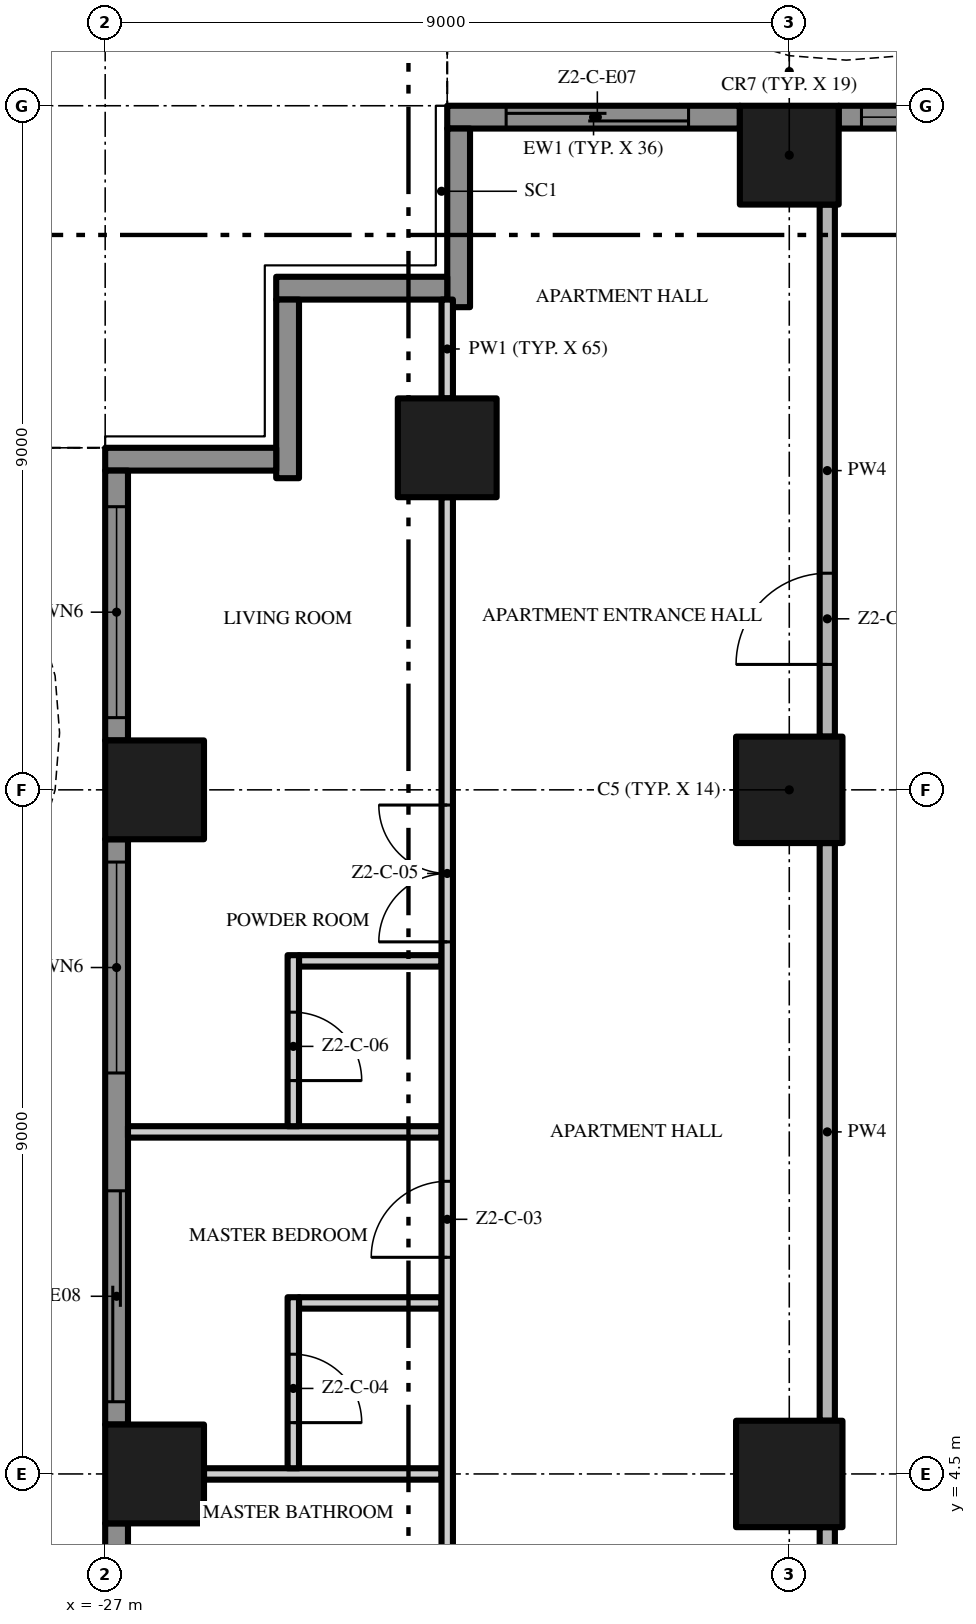
"""IFC4 building model, lengths in metres.
Left out: names, types, materials, properties, quantities, classifications, styles, units other than length and angle.
Written with IfcOpenShell. Run it as: python <this file> out.ifc"""

import sys

from ifc_helpers import new_model, si_unit, direction, frame, frame_2d, origin, origin_2d, place, context, subcontext, project, spatial, polyline, rectangle, outline, extrude, element, fill, save


model = new_model("IFC4")
c1 = context("Model", 3, precision=1e-05, world=origin(), true_north=direction((0.0, 1.0)))
c2 = subcontext(c1, "Body", "Model", "MODEL_VIEW")
j1 = project(units=[si_unit("LENGTHUNIT", "METRE"), si_unit("PLANEANGLEUNIT", "RADIAN")], contexts=[c1])
p1 = place(None, origin())
s1 = spatial("IfcSite", under=j1, at=p1, CompositionType="ELEMENT")
p2 = place(p1, origin())
s2 = spatial("IfcBuilding", under=s1, at=p2, CompositionType="ELEMENT")
p3 = place(p2, frame((0.0, 0.0, 92.2)))
s3 = spatial("IfcBuildingStorey", under=s2, at=p3, CompositionType="ELEMENT", Elevation=92.2)
p4 = place(p3, frame((-18.0, 13.5, 0.0), z_axis=(0.0, 0.0, 1.0), x_axis=(1.0, 0.0, 0.0)))
e1 = element("IfcColumn", 1, at=p4, inside=s3, PredefinedType="COLUMN", context=c2, shape_type="SweptSolid", body=[
    extrude(rectangle(XDim=1.4, YDim=1.4, at=origin_2d()), origin(), (0.0, 0.0, 1.0), 3.5),
])
p5 = place(p3, frame((-18.0, 21.85, 0.0), z_axis=(0.0, 0.0, 1.0), x_axis=(1.0, 0.0, 0.0)))
e2 = element("IfcColumn", 2, at=p5, inside=s3, PredefinedType="COLUMN", context=c2, shape_type="SweptSolid", body=[
    extrude(rectangle(XDim=1.3, YDim=1.3, at=origin_2d()), origin(), (0.0, 0.0, 1.0), 3.5),
])
p6 = place(p3, frame((-18.0, 4.5, 0.0), z_axis=(0.0, 0.0, 1.0), x_axis=(1.0, 0.0, 0.0)))
e3 = element("IfcColumn", 3, at=p6, inside=s3, PredefinedType="COLUMN", context=c2, shape_type="SweptSolid", body=[
    extrude(rectangle(XDim=1.4, YDim=1.4, at=origin_2d()), origin(), (0.0, 0.0, 1.0), 3.5),
])
for number, where, z_axis, x_axis in (
    (4, (-26.35, 13.5, 0.0), (0.0, 0.0, 1.0), (1.0, 0.0, 0.0)),
    (5, (-22.5, 18.0, 0.0), (0.0, 0.0, 1.0), (1.0, 0.0, 0.0)),
    (6, (-26.35, 4.5, 0.0), (0.0, 0.0, 1.0), (1.0, 0.0, 0.0)),
):
    element("IfcColumn", number, at=place(p3, frame(where, z_axis=z_axis, x_axis=x_axis)), inside=s3, PredefinedType="COLUMN", context=c2, shape_type="SweptSolid", body=[
        extrude(rectangle(XDim=1.3, YDim=1.3, at=origin_2d()), origin(), (0.0, 0.0, 1.0), 3.5),
    ])
p7 = place(p3, frame((-17.35, 22.35, 0.0), z_axis=(0.0, 0.0, 1.0), x_axis=(1.0, 0.0, 0.0)))
e7 = element("IfcWall", 7, at=p7, inside=s3, PredefinedType="SOLIDWALL", context=c2, shape_type="SweptSolid", body=[
    extrude(rectangle(XDim=3.85, YDim=0.3, at=frame_2d((1.925, 0.0))), origin(), (0.0, 0.0, 1.0), 3.5),
])
p8 = place(p7, frame((0.3, 0.0, 0.45)))
e8 = element("IfcOpeningElement", 8, at=p8, cuts=e7, PredefinedType="OPENING", context=c2, shape_type="SweptSolid", body=[
    extrude(rectangle(XDim=2.775, YDim=2.65, at=frame_2d((1.387, 1.325))), frame((0.0, 0.16, 0.0), z_axis=(0.0, -1.0, 0.0), x_axis=(1.0, 0.0, 0.0)), (0.0, 0.0, 1.0), 0.32),
])
p9 = place(p3, frame((-22.5, 22.35, 0.0), z_axis=(0.0, 0.0, 1.0), x_axis=(1.0, 0.0, 0.0)))
e9 = element("IfcWall", 9, at=p9, inside=s3, PredefinedType="SOLIDWALL", context=c2, shape_type="SweptSolid", body=[
    extrude(rectangle(XDim=3.85, YDim=0.3, at=frame_2d((1.925, 0.0))), origin(), (0.0, 0.0, 1.0), 3.5),
])
p10 = place(p9, frame((0.775, 0.0, 0.0)))
e10 = element("IfcOpeningElement", 10, at=p10, cuts=e9, PredefinedType="OPENING", context=c2, shape_type="SweptSolid", body=[
    extrude(rectangle(XDim=2.4, YDim=2.4, at=frame_2d((1.2, 1.2))), frame((0.0, 0.16, 0.0), z_axis=(0.0, -1.0, 0.0), x_axis=(1.0, 0.0, 0.0)), (0.0, 0.0, 1.0), 0.32),
])
p11 = place(p3, frame((-22.35, 19.85, 0.0), z_axis=(0.0, 0.0, 1.0), x_axis=(0.0, 1.0, 0.0)))
e11 = element("IfcWall", 11, at=p11, inside=s3, PredefinedType="SOLIDWALL", context=c2, shape_type="SweptSolid", body=[
    extrude(rectangle(XDim=2.35, YDim=0.3, at=frame_2d((1.175, 0.0))), origin(), (0.0, 0.0, 1.0), 3.5),
])
p12 = place(p3, frame((-24.75, 20.1, 0.0), z_axis=(0.0, 0.0, 1.0), x_axis=(1.0, 0.0, 0.0)))
e12 = element("IfcWall", 12, at=p12, inside=s3, PredefinedType="SOLIDWALL", context=c2, shape_type="SweptSolid", body=[
    extrude(rectangle(XDim=2.25, YDim=0.3, at=frame_2d((1.125, 0.0))), origin(), (0.0, 0.0, 1.0), 3.5),
])
p13 = place(p3, frame((-24.6, 17.6, 0.0), z_axis=(0.0, 0.0, 1.0), x_axis=(0.0, 1.0, 0.0)))
e13 = element("IfcWall", 13, at=p13, inside=s3, PredefinedType="SOLIDWALL", context=c2, shape_type="SweptSolid", body=[
    extrude(rectangle(XDim=2.35, YDim=0.3, at=frame_2d((1.175, 0.0))), origin(), (0.0, 0.0, 1.0), 3.5),
])
p14 = place(p3, frame((-27.0, 17.85, 0.0), z_axis=(0.0, 0.0, 1.0), x_axis=(1.0, 0.0, 0.0)))
e14 = element("IfcWall", 14, at=p14, inside=s3, PredefinedType="SOLIDWALL", context=c2, shape_type="SweptSolid", body=[
    extrude(rectangle(XDim=2.25, YDim=0.3, at=frame_2d((1.125, 0.0))), origin(), (0.0, 0.0, 1.0), 3.5),
])
p15 = place(p3, frame((-26.85, 14.15, 0.0), z_axis=(0.0, 0.0, 1.0), x_axis=(0.0, 1.0, 0.0)))
e15 = element("IfcWall", 15, at=p15, inside=s3, PredefinedType="SOLIDWALL", context=c2, shape_type="SweptSolid", body=[
    extrude(rectangle(XDim=3.55, YDim=0.3, at=frame_2d((1.775, 0.0))), origin(), (0.0, 0.0, 1.0), 3.5),
])
p16 = place(p15, frame((0.3, 0.0, 0.45)))
e16 = element("IfcOpeningElement", 16, at=p16, cuts=e15, PredefinedType="OPENING", context=c2, shape_type="SweptSolid", body=[
    extrude(rectangle(XDim=2.775, YDim=2.65, at=frame_2d((1.387, 1.325))), frame((0.0, 0.16, 0.0), z_axis=(0.0, -1.0, 0.0), x_axis=(1.0, 0.0, 0.0)), (0.0, 0.0, 1.0), 0.32),
])
p17 = place(p3, frame((-26.85, 5.15, 0.0), z_axis=(0.0, 0.0, 1.0), x_axis=(0.0, 1.0, 0.0)))
e17 = element("IfcWall", 17, at=p17, inside=s3, PredefinedType="SOLIDWALL", context=c2, shape_type="SweptSolid", body=[
    extrude(rectangle(XDim=7.7, YDim=0.3, at=frame_2d((3.85, 0.0))), origin(), (0.0, 0.0, 1.0), 3.5),
])
p18 = place(p17, frame((4.625, 0.0, 0.45)))
e18 = element("IfcOpeningElement", 18, at=p18, cuts=e17, PredefinedType="OPENING", context=c2, shape_type="SweptSolid", body=[
    extrude(rectangle(XDim=2.775, YDim=2.65, at=frame_2d((1.387, 1.325))), frame((0.0, 0.16, 0.0), z_axis=(0.0, -1.0, 0.0), x_axis=(1.0, 0.0, 0.0)), (0.0, 0.0, 1.0), 0.32),
])
p19 = place(p17, frame((0.3, 0.0, 0.0)))
e19 = element("IfcOpeningElement", 19, at=p19, cuts=e17, PredefinedType="OPENING", context=c2, shape_type="SweptSolid", body=[
    extrude(rectangle(XDim=2.775, YDim=2.4, at=frame_2d((1.387, 1.2))), frame((0.0, 0.16, 0.0), z_axis=(0.0, -1.0, 0.0), x_axis=(1.0, 0.0, 0.0)), (0.0, 0.0, 1.0), 0.32),
])
p20 = place(p3, frame((-26.85, -3.85, 0.0), z_axis=(0.0, 0.0, 1.0), x_axis=(0.0, 1.0, 0.0)))
e20 = element("IfcWall", 20, at=p20, inside=s3, PredefinedType="SOLIDWALL", context=c2, shape_type="SweptSolid", body=[
    extrude(rectangle(XDim=7.7, YDim=0.3, at=frame_2d((3.85, 0.0))), origin(), (0.0, 0.0, 1.0), 3.5),
])
p21 = place(p20, frame((4.625, 0.0, 0.45)))
e21 = element("IfcOpeningElement", 21, at=p21, cuts=e20, PredefinedType="OPENING", context=c2, shape_type="SweptSolid", body=[
    extrude(rectangle(XDim=2.775, YDim=2.65, at=frame_2d((1.387, 1.325))), frame((0.0, 0.16, 0.0), z_axis=(0.0, -1.0, 0.0), x_axis=(1.0, 0.0, 0.0)), (0.0, 0.0, 1.0), 0.32),
])
p22 = place(p20, frame((0.3, 0.0, 0.45)))
e22 = element("IfcOpeningElement", 22, at=p22, cuts=e20, PredefinedType="OPENING", context=c2, shape_type="SweptSolid", body=[
    extrude(rectangle(XDim=2.775, YDim=2.65, at=frame_2d((1.387, 1.325))), frame((0.0, 0.16, 0.0), z_axis=(0.0, -1.0, 0.0), x_axis=(1.0, 0.0, 0.0)), (0.0, 0.0, 1.0), 0.32),
])
p23 = place(p3, origin())
e23 = element("IfcWall", 23, at=p23, inside=s3, PredefinedType="USERDEFINED", context=c2, shape_type="SweptSolid", body=[
    extrude(outline(polyline([(-13.5, 24.3), (-15.0, 23.595), (-16.5, 23.159), (-17.25, 23.1), (-18.0, 23.159), (-19.5, 23.595), (-21.0, 24.3), (-22.5, 25.005), (-22.606, 24.779), (-21.106, 24.074), (-19.589, 23.36), (-18.045, 22.911), (-17.25, 22.849), (-16.455, 22.911), (-14.911, 23.36), (-13.394, 24.074), (-13.5, 24.3)])), origin(), (0.0, 0.0, 1.0), 0.9),
])
p24 = place(p3, origin())
e24 = element("IfcWall", 24, at=p24, inside=s3, PredefinedType="USERDEFINED", context=c2, shape_type="SweptSolid", body=[
    extrude(outline(polyline([(-28.8, 18.0), (-28.095, 16.5), (-27.659, 15.0), (-27.6, 14.25), (-27.659, 13.5), (-28.095, 12.0), (-28.8, 10.5), (-29.505, 9.0), (-29.941, 7.5), (-30.0, 6.75), (-29.941, 6.0), (-29.505, 4.5), (-28.8, 3.0), (-28.095, 1.5), (-27.659, 0.0), (-27.6, -0.75), (-27.659, -1.5), (-28.095, -3.0), (-28.8, -4.5), (-29.505, -6.0), (-29.941, -7.5), (-30.0, -8.25), (-29.941, -9.0), (-29.505, -10.5), (-28.8, -12.0), (-28.095, -13.5), (-27.659, -15.0), (-27.6, -15.75), (-27.659, -16.5), (-28.095, -18.0), (-27.855, -18.07), (-27.411, -16.545), (-27.349, -15.75), (-27.411, -14.955), (-27.86, -13.411), (-28.574, -11.894), (-29.271, -10.411), (-29.694, -8.955), (-29.749, -8.25), (-29.694, -7.545), (-29.271, -6.089), (-28.574, -4.606), (-27.86, -3.089), (-27.411, -1.545), (-27.349, -0.75), (-27.411, 0.045), (-27.86, 1.589), (-28.574, 3.106), (-29.271, 4.589), (-29.694, 6.045), (-29.749, 6.75), (-29.694, 7.455), (-29.271, 8.911), (-28.574, 10.394), (-27.86, 11.911), (-27.411, 13.455), (-27.349, 14.25), (-27.411, 15.045), (-27.86, 16.589), (-28.574, 18.106), (-28.8, 18.0)])), origin(), (0.0, 0.0, 1.0), 0.9),
])
p25 = place(p3, frame((-25.7, 4.5, 0.0), z_axis=(0.0, 0.0, 1.0), x_axis=(1.0, 0.0, 0.0)))
e25 = element("IfcWall", 25, at=p25, inside=s3, PredefinedType="PARTITIONING", context=c2, shape_type="SweptSolid", body=[
    extrude(rectangle(XDim=3.125, YDim=0.15, at=frame_2d((1.562, 0.0))), origin(), (0.0, 0.0, 1.0), 3.5),
])
p26 = place(p3, frame((-24.45, 6.75, 0.0), z_axis=(0.0, 0.0, 1.0), x_axis=(1.0, 0.0, 0.0)))
e26 = element("IfcWall", 26, at=p26, inside=s3, PredefinedType="PARTITIONING", context=c2, shape_type="SweptSolid", body=[
    extrude(rectangle(XDim=1.875, YDim=0.15, at=frame_2d((0.938, 0.0))), origin(), (0.0, 0.0, 1.0), 3.5),
])
p27 = place(p3, frame((-26.7, 9.0, 0.0), z_axis=(0.0, 0.0, 1.0), x_axis=(1.0, 0.0, 0.0)))
e27 = element("IfcWall", 27, at=p27, inside=s3, PredefinedType="PARTITIONING", context=c2, shape_type="SweptSolid", body=[
    extrude(rectangle(XDim=4.125, YDim=0.15, at=frame_2d((2.062, 0.0))), origin(), (0.0, 0.0, 1.0), 3.5),
])
p28 = place(p3, frame((-24.45, 11.25, 0.0), z_axis=(0.0, 0.0, 1.0), x_axis=(1.0, 0.0, 0.0)))
e28 = element("IfcWall", 28, at=p28, inside=s3, PredefinedType="PARTITIONING", context=c2, shape_type="SweptSolid", body=[
    extrude(rectangle(XDim=1.875, YDim=0.15, at=frame_2d((0.938, 0.0))), origin(), (0.0, 0.0, 1.0), 3.5),
])
p29 = place(p3, frame((-24.525, 6.825, 0.0), z_axis=(0.0, 0.0, 1.0), x_axis=(0.0, -1.0, 0.0)))
e29 = element("IfcWall", 29, at=p29, inside=s3, PredefinedType="PARTITIONING", context=c2, shape_type="SweptSolid", body=[
    extrude(rectangle(XDim=2.25, YDim=0.15, at=frame_2d((1.125, 0.0))), origin(), (0.0, 0.0, 1.0), 3.5),
])
p30 = place(p29, frame((0.75, 0.0, 0.0)))
e30 = element("IfcOpeningElement", 30, at=p30, cuts=e29, PredefinedType="OPENING", context=c2, shape_type="SweptSolid", body=[
    extrude(rectangle(XDim=0.9, YDim=2.1, at=frame_2d((0.45, 1.05))), frame((0.0, 0.085, 0.0), z_axis=(0.0, -1.0, 0.0), x_axis=(1.0, 0.0, 0.0)), (0.0, 0.0, 1.0), 0.17),
])
p31 = place(p3, frame((-24.525, 11.325, 0.0), z_axis=(0.0, 0.0, 1.0), x_axis=(0.0, -1.0, 0.0)))
e31 = element("IfcWall", 31, at=p31, inside=s3, PredefinedType="PARTITIONING", context=c2, shape_type="SweptSolid", body=[
    extrude(rectangle(XDim=2.25, YDim=0.15, at=frame_2d((1.125, 0.0))), origin(), (0.0, 0.0, 1.0), 3.5),
])
p32 = place(p31, frame((0.75, 0.0, 0.0)))
e32 = element("IfcOpeningElement", 32, at=p32, cuts=e31, PredefinedType="OPENING", context=c2, shape_type="SweptSolid", body=[
    extrude(rectangle(XDim=0.9, YDim=2.1, at=frame_2d((0.45, 1.05))), frame((0.0, 0.085, 0.0), z_axis=(0.0, -1.0, 0.0), x_axis=(1.0, 0.0, 0.0)), (0.0, 0.0, 1.0), 0.17),
])
p33 = place(p3, frame((-22.5, 0.1, 0.0), z_axis=(0.0, 0.0, 1.0), x_axis=(0.0, 1.0, 0.0)))
e33 = element("IfcWall", 33, at=p33, inside=s3, PredefinedType="PARTITIONING", context=c2, shape_type="SweptSolid", body=[
    extrude(rectangle(XDim=17.25, YDim=0.15, at=frame_2d((8.625, 0.0))), origin(), (0.0, 0.0, 1.0), 3.5),
])
p34 = place(p33, frame((1.65, 0.0, 0.0)))
e34 = element("IfcOpeningElement", 34, at=p34, cuts=e33, PredefinedType="OPENING", context=c2, shape_type="SweptSolid", body=[
    extrude(rectangle(XDim=1.0, YDim=2.4, at=frame_2d((0.5, 1.2))), frame((0.0, 0.085, 0.0), z_axis=(0.0, -1.0, 0.0), x_axis=(1.0, 0.0, 0.0)), (0.0, 0.0, 1.0), 0.17),
])
p35 = place(p33, frame((7.25, 0.0, 0.0)))
e35 = element("IfcOpeningElement", 35, at=p35, cuts=e33, PredefinedType="OPENING", context=c2, shape_type="SweptSolid", body=[
    extrude(rectangle(XDim=1.0, YDim=2.4, at=frame_2d((0.5, 1.2))), frame((0.0, 0.085, 0.0), z_axis=(0.0, -1.0, 0.0), x_axis=(1.0, 0.0, 0.0)), (0.0, 0.0, 1.0), 0.17),
])
p36 = place(p33, frame((11.4, 0.0, 0.0)))
e36 = element("IfcOpeningElement", 36, at=p36, cuts=e33, PredefinedType="OPENING", context=c2, shape_type="SweptSolid", body=[
    extrude(rectangle(XDim=1.8, YDim=2.4, at=frame_2d((0.9, 1.2))), frame((0.0, 0.085, 0.0), z_axis=(0.0, -1.0, 0.0), x_axis=(1.0, 0.0, 0.0)), (0.0, 0.0, 1.0), 0.17),
])
p37 = place(p3, frame((-22.5, 18.65, 0.0), z_axis=(0.0, 0.0, 1.0), x_axis=(0.0, 1.0, 0.0)))
e37 = element("IfcWall", 37, at=p37, inside=s3, PredefinedType="PARTITIONING", context=c2, shape_type="SweptSolid", body=[
    extrude(rectangle(XDim=1.3, YDim=0.15, at=frame_2d((0.65, 0.0))), origin(), (0.0, 0.0, 1.0), 3.5),
])
p38 = place(p3, frame((-17.5, -0.2, 0.0), z_axis=(0.0, 0.0, 1.0), x_axis=(0.0, 1.0, 0.0)))
e38 = element("IfcWall", 38, at=p38, inside=s3, PredefinedType="PARTITIONING", context=c2, shape_type="SweptSolid", body=[
    extrude(rectangle(XDim=4.0, YDim=0.2, at=frame_2d((2.0, 0.0))), origin(), (0.0, 0.0, 1.0), 3.5),
])
p39 = place(p3, frame((-17.5, 5.2, 0.0), z_axis=(0.0, 0.0, 1.0), x_axis=(0.0, 1.0, 0.0)))
e39 = element("IfcWall", 39, at=p39, inside=s3, PredefinedType="PARTITIONING", context=c2, shape_type="SweptSolid", body=[
    extrude(rectangle(XDim=7.6, YDim=0.2, at=frame_2d((3.8, 0.0))), origin(), (0.0, 0.0, 1.0), 3.5),
])
p40 = place(p3, frame((-17.5, 14.2, 0.0), z_axis=(0.0, 0.0, 1.0), x_axis=(0.0, 1.0, 0.0)))
e40 = element("IfcWall", 40, at=p40, inside=s3, PredefinedType="PARTITIONING", context=c2, shape_type="SweptSolid", body=[
    extrude(rectangle(XDim=7.0, YDim=0.2, at=frame_2d((3.5, 0.0))), origin(), (0.0, 0.0, 1.0), 3.5),
])
p41 = place(p40, frame((0.95, 0.0, 0.0)))
e41 = element("IfcOpeningElement", 41, at=p41, cuts=e40, PredefinedType="OPENING", context=c2, shape_type="SweptSolid", body=[
    extrude(rectangle(XDim=1.2, YDim=2.4, at=frame_2d((0.6, 1.2))), frame((0.0, 0.11, 0.0), z_axis=(0.0, -1.0, 0.0), x_axis=(1.0, 0.0, 0.0)), (0.0, 0.0, 1.0), 0.22),
])
p42 = place(p8, origin())
e42 = element("IfcWindow", 42, at=p42, inside=s3, PartitioningType="SINGLE_PANEL", PredefinedType="WINDOW", context=c2, shape_type="SweptSolid", body=[
    extrude(rectangle(XDim=2.775, YDim=2.65, at=frame_2d((1.387, 1.325))), frame((0.0, 0.03, 0.0), z_axis=(0.0, -1.0, 0.0), x_axis=(1.0, 0.0, 0.0)), (0.0, 0.0, 1.0), 0.06),
])
fill(e8, e42)
p43 = place(p10, origin())
e43 = element("IfcDoor", 43, at=p43, inside=s3, OperationType="SINGLE_SWING_LEFT", PredefinedType="DOOR", context=c2, shape_type="SweptSolid", body=[
    extrude(rectangle(XDim=2.4, YDim=2.4, at=frame_2d((1.2, 1.2))), frame((0.0, 0.025, 0.0), z_axis=(0.0, -1.0, 0.0), x_axis=(1.0, 0.0, 0.0)), (0.0, 0.0, 1.0), 0.05),
])
fill(e10, e43)
p44 = place(p16, origin())
e44 = element("IfcWindow", 44, at=p44, inside=s3, PartitioningType="SINGLE_PANEL", PredefinedType="WINDOW", context=c2, shape_type="SweptSolid", body=[
    extrude(rectangle(XDim=2.775, YDim=2.65, at=frame_2d((1.387, 1.325))), frame((0.0, 0.03, 0.0), z_axis=(0.0, -1.0, 0.0), x_axis=(1.0, 0.0, 0.0)), (0.0, 0.0, 1.0), 0.06),
])
fill(e16, e44)
p45 = place(p18, origin())
e45 = element("IfcWindow", 45, at=p45, inside=s3, PartitioningType="SINGLE_PANEL", PredefinedType="WINDOW", context=c2, shape_type="SweptSolid", body=[
    extrude(rectangle(XDim=2.775, YDim=2.65, at=frame_2d((1.387, 1.325))), frame((0.0, 0.03, 0.0), z_axis=(0.0, -1.0, 0.0), x_axis=(1.0, 0.0, 0.0)), (0.0, 0.0, 1.0), 0.06),
])
fill(e18, e45)
p46 = place(p19, origin())
e46 = element("IfcDoor", 46, at=p46, inside=s3, OperationType="SINGLE_SWING_LEFT", PredefinedType="DOOR", context=c2, shape_type="SweptSolid", body=[
    extrude(rectangle(XDim=2.775, YDim=2.4, at=frame_2d((1.387, 1.2))), frame((0.0, 0.025, 0.0), z_axis=(0.0, -1.0, 0.0), x_axis=(1.0, 0.0, 0.0)), (0.0, 0.0, 1.0), 0.05),
])
fill(e19, e46)
p47 = place(p41, origin())
e47 = element("IfcDoor", 47, at=p47, inside=s3, OperationType="SINGLE_SWING_LEFT", PredefinedType="DOOR", context=c2, shape_type="SweptSolid", body=[
    extrude(rectangle(XDim=1.2, YDim=2.4, at=frame_2d((0.6, 1.2))), frame((0.0, 0.025, 0.0), z_axis=(0.0, -1.0, 0.0), x_axis=(1.0, 0.0, 0.0)), (0.0, 0.0, 1.0), 0.05),
])
fill(e41, e47)
p48 = place(p35, origin())
e48 = element("IfcDoor", 48, at=p48, inside=s3, OperationType="SINGLE_SWING_LEFT", PredefinedType="DOOR", context=c2, shape_type="SweptSolid", body=[
    extrude(rectangle(XDim=1.0, YDim=2.4, at=frame_2d((0.5, 1.2))), frame((0.0, 0.025, 0.0), z_axis=(0.0, -1.0, 0.0), x_axis=(1.0, 0.0, 0.0)), (0.0, 0.0, 1.0), 0.05),
])
fill(e35, e48)
p49 = place(p30, origin())
e49 = element("IfcDoor", 49, at=p49, inside=s3, OperationType="SINGLE_SWING_RIGHT", PredefinedType="DOOR", context=c2, shape_type="SweptSolid", body=[
    extrude(rectangle(XDim=0.9, YDim=2.1, at=frame_2d((0.45, 1.05))), frame((0.0, 0.025, 0.0), z_axis=(0.0, -1.0, 0.0), x_axis=(1.0, 0.0, 0.0)), (0.0, 0.0, 1.0), 0.05),
])
fill(e30, e49)
p50 = place(p36, origin())
e50 = element("IfcDoor", 50, at=p50, inside=s3, OperationType="DOUBLE_DOOR_SINGLE_SWING", PredefinedType="DOOR", context=c2, shape_type="SweptSolid", body=[
    extrude(rectangle(XDim=1.8, YDim=2.4, at=frame_2d((0.9, 1.2))), frame((0.0, 0.025, 0.0), z_axis=(0.0, -1.0, 0.0), x_axis=(1.0, 0.0, 0.0)), (0.0, 0.0, 1.0), 0.05),
])
fill(e36, e50)
p51 = place(p32, origin())
e51 = element("IfcDoor", 51, at=p51, inside=s3, OperationType="SINGLE_SWING_RIGHT", PredefinedType="DOOR", context=c2, shape_type="SweptSolid", body=[
    extrude(rectangle(XDim=0.9, YDim=2.1, at=frame_2d((0.45, 1.05))), frame((0.0, 0.025, 0.0), z_axis=(0.0, -1.0, 0.0), x_axis=(1.0, 0.0, 0.0)), (0.0, 0.0, 1.0), 0.05),
])
fill(e32, e51)
save(model, sys.argv[1])
